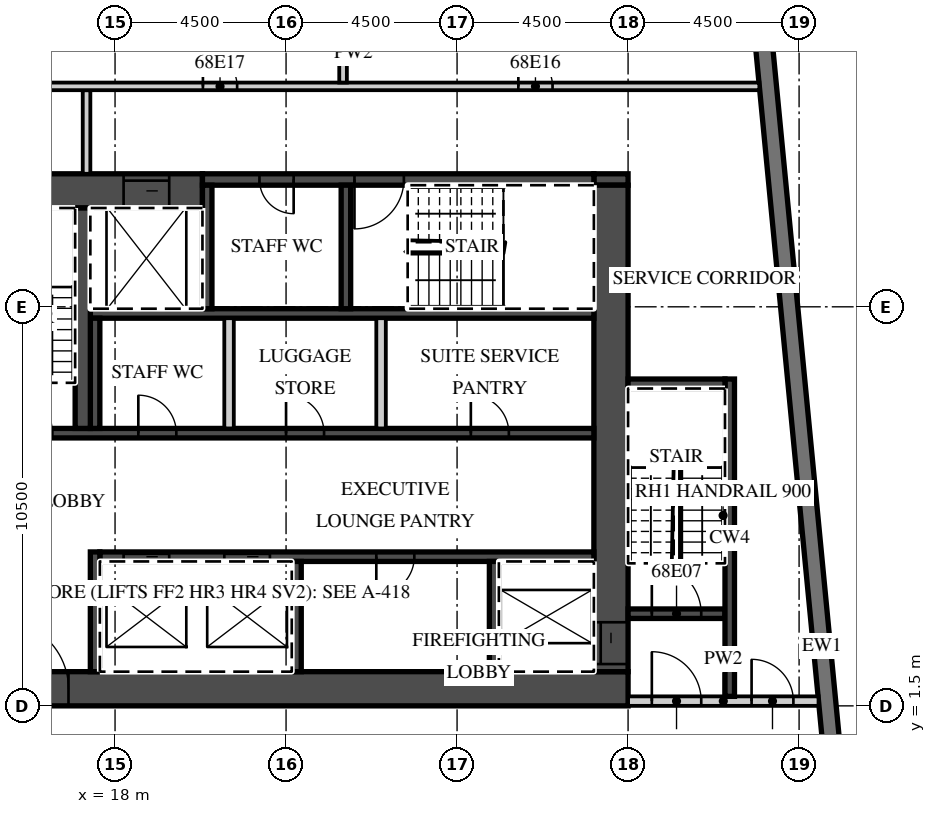
"""IFC4 building model, lengths in metres.
Left out: names, types, materials, properties, quantities, classifications, styles, units other than length and angle.
Written with IfcOpenShell. Run it as: python <this file> out.ifc"""

import sys

from ifc_helpers import new_model, si_unit, direction, frame, frame_2d, origin, place, context, subcontext, project, spatial, rectangle, extrude, element, fill, save


model = new_model("IFC4")
c1 = context("Model", 3, precision=1e-05, world=origin(), true_north=direction((0.0, 1.0)))
c2 = subcontext(c1, "Body", "Model", "MODEL_VIEW")
j1 = project(units=[si_unit("LENGTHUNIT", "METRE"), si_unit("PLANEANGLEUNIT", "RADIAN")], contexts=[c1])
p1 = place(None, origin())
s1 = spatial("IfcSite", under=j1, at=p1, CompositionType="ELEMENT")
p2 = place(p1, origin())
s2 = spatial("IfcBuilding", under=s1, at=p2, CompositionType="ELEMENT")
p3 = place(p2, frame((0.0, 0.0, 275.1)))
s3 = spatial("IfcBuildingStorey", under=s2, at=p3, CompositionType="ELEMENT", Elevation=275.1)
p4 = place(p3, frame((38.132, -12.858, 0.0), z_axis=(0.0, 0.0, 1.0), x_axis=(-0.095847749461, 0.995396006082, 0.0)))
e1 = element("IfcWall", 1, at=p4, inside=s3, PredefinedType="SOLIDWALL", context=c2, shape_type="SweptSolid", body=[
    extrude(rectangle(XDim=32.0, YDim=0.45, at=frame_2d((16.0, 0.0))), origin(), (0.0, 0.0, 1.0), 3.02),
])
p5 = place(p3, frame((13.5, 1.95, 0.0), z_axis=(0.0, 0.0, 1.0), x_axis=(1.0, 0.0, 0.0)))
e2 = element("IfcWall", 2, at=p5, inside=s3, PredefinedType="SHEAR", context=c2, shape_type="SweptSolid", body=[
    extrude(rectangle(XDim=18.0, YDim=0.9, at=frame_2d((9.0, 0.0))), origin(), (0.0, 0.0, 1.0), 3.02),
])
p6 = place(p5, frame((1.475, 0.0, 0.0)))
e3 = element("IfcOpeningElement", 3, at=p6, cuts=e2, PredefinedType="OPENING", context=c2, shape_type="SweptSolid", body=[
    extrude(rectangle(XDim=1.8, YDim=2.1, at=frame_2d((0.9, 1.05))), frame((0.0, 0.46, 0.0), z_axis=(0.0, -1.0, 0.0), x_axis=(1.0, 0.0, 0.0)), (0.0, 0.0, 1.0), 0.92),
])
p7 = place(p3, frame((13.5, 15.05, 0.0), z_axis=(0.0, 0.0, 1.0), x_axis=(1.0, 0.0, 0.0)))
e4 = element("IfcWall", 4, at=p7, inside=s3, PredefinedType="SHEAR", context=c2, shape_type="SweptSolid", body=[
    extrude(rectangle(XDim=6.8, YDim=0.9, at=frame_2d((3.4, 0.0))), origin(), (0.0, 0.0, 1.0), 3.02),
])
p8 = place(p7, frame((4.725, 0.0, 0.0)))
e5 = element("IfcOpeningElement", 5, at=p8, cuts=e4, PredefinedType="OPENING", context=c2, shape_type="SweptSolid", body=[
    extrude(rectangle(XDim=1.2, YDim=2.1, at=frame_2d((0.6, 1.05))), frame((0.0, 0.46, 0.0), z_axis=(0.0, -1.0, 0.0), x_axis=(1.0, 0.0, 0.0)), (0.0, 0.0, 1.0), 0.92),
])
p9 = place(p3, frame((30.6, 15.35, 0.0), z_axis=(0.0, 0.0, 1.0), x_axis=(1.0, 0.0, 0.0)))
e6 = element("IfcWall", 6, at=p9, inside=s3, PredefinedType="SHEAR", context=c2, shape_type="SweptSolid", body=[
    extrude(rectangle(XDim=0.9, YDim=0.3, at=frame_2d((0.45, 0.0))), origin(), (0.0, 0.0, 1.0), 3.02),
])
p10 = place(p3, frame((20.3, 15.35, 0.0), z_axis=(0.0, 0.0, 1.0), x_axis=(1.0, 0.0, 0.0)))
e7 = element("IfcWall", 7, at=p10, inside=s3, PredefinedType="SHEAR", context=c2, shape_type="SweptSolid", body=[
    extrude(rectangle(XDim=10.3, YDim=0.3, at=frame_2d((5.15, 0.0))), origin(), (0.0, 0.0, 1.0), 3.02),
])
p11 = place(p10, frame((4.0, 0.0, 0.0)))
e8 = element("IfcOpeningElement", 8, at=p11, cuts=e7, PredefinedType="OPENING", context=c2, shape_type="SweptSolid", body=[
    extrude(rectangle(XDim=1.3, YDim=2.1, at=frame_2d((0.65, 1.05))), frame((0.0, 0.16, 0.0), z_axis=(0.0, -1.0, 0.0), x_axis=(1.0, 0.0, 0.0)), (0.0, 0.0, 1.0), 0.32),
])
p12 = place(p10, frame((1.5, 0.0, 0.0)))
e9 = element("IfcOpeningElement", 9, at=p12, cuts=e7, PredefinedType="OPENING", context=c2, shape_type="SweptSolid", body=[
    extrude(rectangle(XDim=0.9, YDim=2.1, at=frame_2d((0.45, 1.05))), frame((0.0, 0.16, 0.0), z_axis=(0.0, -1.0, 0.0), x_axis=(1.0, 0.0, 0.0)), (0.0, 0.0, 1.0), 0.32),
])
p13 = place(p3, frame((31.05, 2.4, 0.0), z_axis=(0.0, 0.0, 1.0), x_axis=(0.0, 1.0, 0.0)))
e10 = element("IfcWall", 10, at=p13, inside=s3, PredefinedType="SHEAR", context=c2, shape_type="SweptSolid", body=[
    extrude(rectangle(XDim=12.8, YDim=0.9, at=frame_2d((6.4, 0.0))), origin(), (0.0, 0.0, 1.0), 3.02),
])
p14 = place(p13, frame((0.2, 0.0, 0.0)))
e11 = element("IfcOpeningElement", 11, at=p14, cuts=e10, PredefinedType="OPENING", context=c2, shape_type="SweptSolid", body=[
    extrude(rectangle(XDim=1.1, YDim=2.1, at=frame_2d((0.55, 1.05))), frame((0.0, 0.46, 0.0), z_axis=(0.0, -1.0, 0.0), x_axis=(1.0, 0.0, 0.0)), (0.0, 0.0, 1.0), 0.92),
])
p15 = place(p3, frame((17.6, 5.425, 0.0), z_axis=(0.0, 0.0, 1.0), x_axis=(1.0, 0.0, 0.0)))
e12 = element("IfcWall", 12, at=p15, inside=s3, PredefinedType="SHEAR", context=c2, shape_type="SweptSolid", body=[
    extrude(rectangle(XDim=13.0, YDim=0.25, at=frame_2d((6.5, 0.0))), origin(), (0.0, 0.0, 1.0), 3.02),
])
p16 = place(p15, frame((3.275, 0.0, 0.0)))
e13 = element("IfcOpeningElement", 13, at=p16, cuts=e12, PredefinedType="OPENING", context=c2, shape_type="SweptSolid", body=[
    extrude(rectangle(XDim=1.2, YDim=2.1, at=frame_2d((0.6, 1.05))), frame((0.0, 0.135, 0.0), z_axis=(0.0, -1.0, 0.0), x_axis=(1.0, 0.0, 0.0)), (0.0, 0.0, 1.0), 0.27),
])
p17 = place(p15, frame((0.625, 0.0, 0.0)))
e14 = element("IfcOpeningElement", 14, at=p17, cuts=e12, PredefinedType="OPENING", context=c2, shape_type="SweptSolid", body=[
    extrude(rectangle(XDim=1.2, YDim=2.1, at=frame_2d((0.6, 1.05))), frame((0.0, 0.135, 0.0), z_axis=(0.0, -1.0, 0.0), x_axis=(1.0, 0.0, 0.0)), (0.0, 0.0, 1.0), 0.27),
])
p18 = place(p15, frame((7.275, 0.0, 0.0)))
e15 = element("IfcOpeningElement", 15, at=p18, cuts=e12, PredefinedType="OPENING", context=c2, shape_type="SweptSolid", body=[
    extrude(rectangle(XDim=1.0, YDim=2.1, at=frame_2d((0.5, 1.05))), frame((0.0, 0.135, 0.0), z_axis=(0.0, -1.0, 0.0), x_axis=(1.0, 0.0, 0.0)), (0.0, 0.0, 1.0), 0.27),
])
p19 = place(p3, frame((17.475, 2.4, 0.0), z_axis=(0.0, 0.0, 1.0), x_axis=(0.0, 1.0, 0.0)))
e16 = element("IfcWall", 16, at=p19, inside=s3, PredefinedType="SHEAR", context=c2, shape_type="SweptSolid", body=[
    extrude(rectangle(XDim=3.15, YDim=0.25, at=frame_2d((1.575, 0.0))), origin(), (0.0, 0.0, 1.0), 3.02),
])
for number, where, z_axis, x_axis in (
    (17, (27.975, 2.4, 0.0), (0.0, 0.0, 1.0), (0.0, 1.0, 0.0)),
    (18, (22.775, 2.4, 0.0), (0.0, 0.0, 1.0), (0.0, 1.0, 0.0)),
):
    element("IfcWall", number, at=place(p3, frame(where, z_axis=z_axis, x_axis=x_axis)), inside=s3, PredefinedType="SHEAR", context=c2, shape_type="SweptSolid", body=[
        extrude(rectangle(XDim=2.9, YDim=0.25, at=frame_2d((1.45, 0.0))), origin(), (0.0, 0.0, 1.0), 3.02),
    ])
p20 = place(p3, frame((14.4, 8.675, 0.0), z_axis=(0.0, 0.0, 1.0), x_axis=(1.0, 0.0, 0.0)))
e19 = element("IfcWall", 19, at=p20, inside=s3, PredefinedType="SHEAR", context=c2, shape_type="SweptSolid", body=[
    extrude(rectangle(XDim=16.2, YDim=0.25, at=frame_2d((8.1, 0.0))), origin(), (0.0, 0.0, 1.0), 3.02),
])
p21 = place(p20, frame((0.65, 0.0, 0.0)))
e20 = element("IfcOpeningElement", 20, at=p21, cuts=e19, PredefinedType="OPENING", context=c2, shape_type="SweptSolid", body=[
    extrude(rectangle(XDim=1.3, YDim=2.1, at=frame_2d((0.65, 1.05))), frame((0.0, 0.135, 0.0), z_axis=(0.0, -1.0, 0.0), x_axis=(1.0, 0.0, 0.0)), (0.0, 0.0, 1.0), 0.27),
])
p22 = place(p20, frame((12.962, 0.0, 0.0)))
e21 = element("IfcOpeningElement", 21, at=p22, cuts=e19, PredefinedType="OPENING", context=c2, shape_type="SweptSolid", body=[
    extrude(rectangle(XDim=1.0, YDim=2.1, at=frame_2d((0.5, 1.05))), frame((0.0, 0.135, 0.0), z_axis=(0.0, -1.0, 0.0), x_axis=(1.0, 0.0, 0.0)), (0.0, 0.0, 1.0), 0.27),
])
p23 = place(p20, frame((8.1, 0.0, 0.0)))
e22 = element("IfcOpeningElement", 22, at=p23, cuts=e19, PredefinedType="OPENING", context=c2, shape_type="SweptSolid", body=[
    extrude(rectangle(XDim=1.0, YDim=2.1, at=frame_2d((0.5, 1.05))), frame((0.0, 0.135, 0.0), z_axis=(0.0, -1.0, 0.0), x_axis=(1.0, 0.0, 0.0)), (0.0, 0.0, 1.0), 0.27),
])
p24 = place(p20, frame((4.212, 0.0, 0.0)))
e23 = element("IfcOpeningElement", 23, at=p24, cuts=e19, PredefinedType="OPENING", context=c2, shape_type="SweptSolid", body=[
    extrude(rectangle(XDim=1.0, YDim=2.1, at=frame_2d((0.5, 1.05))), frame((0.0, 0.135, 0.0), z_axis=(0.0, -1.0, 0.0), x_axis=(1.0, 0.0, 0.0)), (0.0, 0.0, 1.0), 0.27),
])
p25 = place(p3, frame((17.35, 11.825, 0.0), z_axis=(0.0, 0.0, 1.0), x_axis=(1.0, 0.0, 0.0)))
e24 = element("IfcWall", 24, at=p25, inside=s3, PredefinedType="SHEAR", context=c2, shape_type="SweptSolid", body=[
    extrude(rectangle(XDim=13.25, YDim=0.25, at=frame_2d((6.625, 0.0))), origin(), (0.0, 0.0, 1.0), 3.02),
])
p26 = place(p3, frame((17.475, 8.8, 0.0), z_axis=(0.0, 0.0, 1.0), x_axis=(0.0, 1.0, 0.0)))
e25 = element("IfcWall", 25, at=p26, inside=s3, PredefinedType="SHEAR", context=c2, shape_type="SweptSolid", body=[
    extrude(rectangle(XDim=2.9, YDim=0.25, at=frame_2d((1.45, 0.0))), origin(), (0.0, 0.0, 1.0), 3.02),
])
for number, where, z_axis, x_axis in (
    (26, (25.0, 8.8, 0.0), (0.0, 0.0, 1.0), (0.0, 1.0, 0.0)),
    (27, (21.0, 8.8, 0.0), (0.0, 0.0, 1.0), (0.0, 1.0, 0.0)),
):
    element("IfcWall", number, at=place(p3, frame(where, z_axis=z_axis, x_axis=x_axis)), inside=s3, PredefinedType="PARTITIONING", context=c2, shape_type="SweptSolid", body=[
        extrude(rectangle(XDim=2.9, YDim=0.25, at=frame_2d((1.45, 0.0))), origin(), (0.0, 0.0, 1.0), 3.02),
    ])
p27 = place(p3, frame((17.15, 8.8, 0.0), z_axis=(0.0, 0.0, 1.0), x_axis=(0.0, 1.0, 0.0)))
e28 = element("IfcWall", 28, at=p27, inside=s3, PredefinedType="SHEAR", context=c2, shape_type="SweptSolid", body=[
    extrude(rectangle(XDim=5.8, YDim=0.4, at=frame_2d((2.9, 0.0))), origin(), (0.0, 0.0, 1.0), 3.02),
])
for number, where, z_axis, x_axis in (
    (29, (20.425, 11.95, 0.0), (0.0, 0.0, 1.0), (0.0, 1.0, 0.0)),
    (30, (24.075, 11.95, 0.0), (0.0, 0.0, 1.0), (0.0, 1.0, 0.0)),
):
    element("IfcWall", number, at=place(p3, frame(where, z_axis=z_axis, x_axis=x_axis)), inside=s3, PredefinedType="SHEAR", context=c2, shape_type="SweptSolid", body=[
        extrude(rectangle(XDim=3.25, YDim=0.25, at=frame_2d((1.625, 0.0))), origin(), (0.0, 0.0, 1.0), 3.02),
    ])
p28 = place(p3, frame((31.5, 1.625, 0.0), z_axis=(0.0, 0.0, 1.0), x_axis=(1.0, 0.0, 0.0)))
e31 = element("IfcWall", 31, at=p28, inside=s3, PredefinedType="PARTITIONING", context=c2, shape_type="SweptSolid", body=[
    extrude(rectangle(XDim=5.012, YDim=0.25, at=frame_2d((2.506, 0.0))), origin(), (0.0, 0.0, 1.0), 3.02),
])
p29 = place(p28, frame((0.625, 0.0, 0.0)))
e32 = element("IfcOpeningElement", 32, at=p29, cuts=e31, PredefinedType="OPENING", context=c2, shape_type="SweptSolid", body=[
    extrude(rectangle(XDim=1.3, YDim=2.1, at=frame_2d((0.65, 1.05))), frame((0.0, 0.135, 0.0), z_axis=(0.0, -1.0, 0.0), x_axis=(1.0, 0.0, 0.0)), (0.0, 0.0, 1.0), 0.27),
])
p30 = place(p28, frame((3.25, 0.0, 0.0)))
e33 = element("IfcOpeningElement", 33, at=p30, cuts=e31, PredefinedType="OPENING", context=c2, shape_type="SweptSolid", body=[
    extrude(rectangle(XDim=1.1, YDim=2.1, at=frame_2d((0.55, 1.05))), frame((0.0, 0.135, 0.0), z_axis=(0.0, -1.0, 0.0), x_axis=(1.0, 0.0, 0.0)), (0.0, 0.0, 1.0), 0.27),
])
p31 = place(p3, frame((31.5, 3.925, 0.0), z_axis=(0.0, 0.0, 1.0), x_axis=(1.0, 0.0, 0.0)))
e34 = element("IfcWall", 34, at=p31, inside=s3, PredefinedType="SHEAR", context=c2, shape_type="SweptSolid", body=[
    extrude(rectangle(XDim=2.55, YDim=0.25, at=frame_2d((1.275, 0.0))), origin(), (0.0, 0.0, 1.0), 3.02),
])
p32 = place(p31, frame((0.625, 0.0, 0.0)))
e35 = element("IfcOpeningElement", 35, at=p32, cuts=e34, PredefinedType="OPENING", context=c2, shape_type="SweptSolid", body=[
    extrude(rectangle(XDim=1.3, YDim=2.1, at=frame_2d((0.65, 1.05))), frame((0.0, 0.135, 0.0), z_axis=(0.0, -1.0, 0.0), x_axis=(1.0, 0.0, 0.0)), (0.0, 0.0, 1.0), 0.27),
])
p33 = place(p3, frame((34.175, 1.75, 0.0), z_axis=(0.0, 0.0, 1.0), x_axis=(0.0, 1.0, 0.0)))
e36 = element("IfcWall", 36, at=p33, inside=s3, PredefinedType="SHEAR", context=c2, shape_type="SweptSolid", body=[
    extrude(rectangle(XDim=8.35, YDim=0.25, at=frame_2d((4.175, 0.0))), origin(), (0.0, 0.0, 1.0), 3.02),
])
p34 = place(p3, frame((31.5, 9.975, 0.0), z_axis=(0.0, 0.0, 1.0), x_axis=(1.0, 0.0, 0.0)))
e37 = element("IfcWall", 37, at=p34, inside=s3, PredefinedType="SHEAR", context=c2, shape_type="SweptSolid", body=[
    extrude(rectangle(XDim=2.55, YDim=0.25, at=frame_2d((1.275, 0.0))), origin(), (0.0, 0.0, 1.0), 3.02),
])
p35 = place(p3, frame((17.25, 15.5, 0.0), z_axis=(0.0, 0.0, 1.0), x_axis=(0.0, 1.0, 0.0)))
e38 = element("IfcWall", 38, at=p35, inside=s3, PredefinedType="PARTITIONING", context=c2, shape_type="SweptSolid", body=[
    extrude(rectangle(XDim=2.2, YDim=0.2, at=frame_2d((1.1, 0.0))), origin(), (0.0, 0.0, 1.0), 3.02),
])
p36 = place(p3, frame((13.6, 17.8, 0.0), z_axis=(0.0, 0.0, 1.0), x_axis=(1.0, 0.0, 0.0)))
e39 = element("IfcWall", 39, at=p36, inside=s3, PredefinedType="PARTITIONING", context=c2, shape_type="SweptSolid", body=[
    extrude(rectangle(XDim=21.354, YDim=0.2, at=frame_2d((10.677, 0.0))), origin(), (0.0, 0.0, 1.0), 3.02),
])
p37 = place(p36, frame((15.012, 0.0, 0.0)))
e40 = element("IfcOpeningElement", 40, at=p37, cuts=e39, PredefinedType="OPENING", context=c2, shape_type="SweptSolid", body=[
    extrude(rectangle(XDim=0.9, YDim=2.1, at=frame_2d((0.45, 1.05))), frame((0.0, 0.11, 0.0), z_axis=(0.0, -1.0, 0.0), x_axis=(1.0, 0.0, 0.0)), (0.0, 0.0, 1.0), 0.22),
])
p38 = place(p36, frame((6.712, 0.0, 0.0)))
e41 = element("IfcOpeningElement", 41, at=p38, cuts=e39, PredefinedType="OPENING", context=c2, shape_type="SweptSolid", body=[
    extrude(rectangle(XDim=0.9, YDim=2.1, at=frame_2d((0.45, 1.05))), frame((0.0, 0.11, 0.0), z_axis=(0.0, -1.0, 0.0), x_axis=(1.0, 0.0, 0.0)), (0.0, 0.0, 1.0), 0.22),
])
p39 = place(p3, frame((24.0, 17.9, 0.0), z_axis=(0.0, 0.0, 1.0), x_axis=(0.0, 1.0, 0.0)))
e42 = element("IfcWall", 42, at=p39, inside=s3, PredefinedType="PARTITIONING", context=c2, shape_type="SweptSolid", body=[
    extrude(rectangle(XDim=3.597, YDim=0.2, at=frame_2d((1.798, 0.0))), origin(), (0.0, 0.0, 1.0), 3.02),
])
p40 = place(p16, origin())
e43 = element("IfcDoor", 43, at=p40, inside=s3, OperationType="SLIDING_TO_RIGHT", PredefinedType="DOOR", context=c2, shape_type="SweptSolid", body=[
    extrude(rectangle(XDim=1.2, YDim=2.1, at=frame_2d((0.6, 1.05))), frame((0.0, 0.025, 0.0), z_axis=(0.0, -1.0, 0.0), x_axis=(1.0, 0.0, 0.0)), (0.0, 0.0, 1.0), 0.05),
])
fill(e13, e43)
p41 = place(p17, origin())
e44 = element("IfcDoor", 44, at=p41, inside=s3, OperationType="SLIDING_TO_LEFT", PredefinedType="DOOR", context=c2, shape_type="SweptSolid", body=[
    extrude(rectangle(XDim=1.2, YDim=2.1, at=frame_2d((0.6, 1.05))), frame((0.0, 0.025, 0.0), z_axis=(0.0, -1.0, 0.0), x_axis=(1.0, 0.0, 0.0)), (0.0, 0.0, 1.0), 0.05),
])
fill(e14, e44)
p42 = place(p8, origin())
e45 = element("IfcDoor", 45, at=p42, inside=s3, OperationType="SLIDING_TO_LEFT", PredefinedType="DOOR", context=c2, shape_type="SweptSolid", body=[
    extrude(rectangle(XDim=1.2, YDim=2.1, at=frame_2d((0.6, 1.05))), frame((0.0, 0.025, 0.0), z_axis=(0.0, -1.0, 0.0), x_axis=(1.0, 0.0, 0.0)), (0.0, 0.0, 1.0), 0.05),
])
fill(e5, e45)
p43 = place(p14, origin())
e46 = element("IfcDoor", 46, at=p43, inside=s3, OperationType="SLIDING_TO_LEFT", PredefinedType="DOOR", context=c2, shape_type="SweptSolid", body=[
    extrude(rectangle(XDim=1.1, YDim=2.1, at=frame_2d((0.55, 1.05))), frame((0.0, 0.025, 0.0), z_axis=(0.0, -1.0, 0.0), x_axis=(1.0, 0.0, 0.0)), (0.0, 0.0, 1.0), 0.05),
])
fill(e11, e46)
p44 = place(p6, origin())
e47 = element("IfcDoor", 47, at=p44, inside=s3, OperationType="DOUBLE_DOOR_DOUBLE_SWING", PredefinedType="DOOR", context=c2, shape_type="SweptSolid", body=[
    extrude(rectangle(XDim=1.8, YDim=2.1, at=frame_2d((0.9, 1.05))), frame((0.0, 0.025, 0.0), z_axis=(0.0, -1.0, 0.0), x_axis=(1.0, 0.0, 0.0)), (0.0, 0.0, 1.0), 0.05),
])
fill(e3, e47)
p45 = place(p29, origin())
e48 = element("IfcDoor", 48, at=p45, inside=s3, OperationType="SINGLE_SWING_LEFT", PredefinedType="DOOR", context=c2, shape_type="SweptSolid", body=[
    extrude(rectangle(XDim=1.3, YDim=2.1, at=frame_2d((0.65, 1.05))), frame((0.0, 0.025, 0.0), z_axis=(0.0, -1.0, 0.0), x_axis=(1.0, 0.0, 0.0)), (0.0, 0.0, 1.0), 0.05),
])
fill(e32, e48)
p46 = place(p32, origin())
e49 = element("IfcDoor", 49, at=p46, inside=s3, OperationType="SINGLE_SWING_LEFT", PredefinedType="DOOR", context=c2, shape_type="SweptSolid", body=[
    extrude(rectangle(XDim=1.3, YDim=2.1, at=frame_2d((0.65, 1.05))), frame((0.0, 0.025, 0.0), z_axis=(0.0, -1.0, 0.0), x_axis=(1.0, 0.0, 0.0)), (0.0, 0.0, 1.0), 0.05),
])
fill(e35, e49)
p47 = place(p30, origin())
e50 = element("IfcDoor", 50, at=p47, inside=s3, OperationType="SINGLE_SWING_LEFT", PredefinedType="DOOR", context=c2, shape_type="SweptSolid", body=[
    extrude(rectangle(XDim=1.1, YDim=2.1, at=frame_2d((0.55, 1.05))), frame((0.0, 0.025, 0.0), z_axis=(0.0, -1.0, 0.0), x_axis=(1.0, 0.0, 0.0)), (0.0, 0.0, 1.0), 0.05),
])
fill(e33, e50)
p48 = place(p11, origin())
e51 = element("IfcDoor", 51, at=p48, inside=s3, OperationType="SINGLE_SWING_LEFT", PredefinedType="DOOR", context=c2, shape_type="SweptSolid", body=[
    extrude(rectangle(XDim=1.3, YDim=2.1, at=frame_2d((0.65, 1.05))), frame((0.0, 0.025, 0.0), z_axis=(0.0, -1.0, 0.0), x_axis=(1.0, 0.0, 0.0)), (0.0, 0.0, 1.0), 0.05),
])
fill(e8, e51)
p49 = place(p12, origin())
e52 = element("IfcDoor", 52, at=p49, inside=s3, OperationType="SINGLE_SWING_RIGHT", PredefinedType="DOOR", context=c2, shape_type="SweptSolid", body=[
    extrude(rectangle(XDim=0.9, YDim=2.1, at=frame_2d((0.45, 1.05))), frame((0.0, 0.025, 0.0), z_axis=(0.0, -1.0, 0.0), x_axis=(1.0, 0.0, 0.0)), (0.0, 0.0, 1.0), 0.05),
])
fill(e9, e52)
p50 = place(p22, origin())
e53 = element("IfcDoor", 53, at=p50, inside=s3, OperationType="SINGLE_SWING_LEFT", PredefinedType="DOOR", context=c2, shape_type="SweptSolid", body=[
    extrude(rectangle(XDim=1.0, YDim=2.1, at=frame_2d((0.5, 1.05))), frame((0.0, 0.025, 0.0), z_axis=(0.0, -1.0, 0.0), x_axis=(1.0, 0.0, 0.0)), (0.0, 0.0, 1.0), 0.05),
])
fill(e21, e53)
p51 = place(p23, origin())
e54 = element("IfcDoor", 54, at=p51, inside=s3, OperationType="SINGLE_SWING_LEFT", PredefinedType="DOOR", context=c2, shape_type="SweptSolid", body=[
    extrude(rectangle(XDim=1.0, YDim=2.1, at=frame_2d((0.5, 1.05))), frame((0.0, 0.025, 0.0), z_axis=(0.0, -1.0, 0.0), x_axis=(1.0, 0.0, 0.0)), (0.0, 0.0, 1.0), 0.05),
])
fill(e22, e54)
p52 = place(p24, origin())
e55 = element("IfcDoor", 55, at=p52, inside=s3, OperationType="SINGLE_SWING_LEFT", PredefinedType="DOOR", context=c2, shape_type="SweptSolid", body=[
    extrude(rectangle(XDim=1.0, YDim=2.1, at=frame_2d((0.5, 1.05))), frame((0.0, 0.025, 0.0), z_axis=(0.0, -1.0, 0.0), x_axis=(1.0, 0.0, 0.0)), (0.0, 0.0, 1.0), 0.05),
])
fill(e23, e55)
p53 = place(p18, origin())
e56 = element("IfcDoor", 56, at=p53, inside=s3, OperationType="SINGLE_SWING_LEFT", PredefinedType="DOOR", context=c2, shape_type="SweptSolid", body=[
    extrude(rectangle(XDim=1.0, YDim=2.1, at=frame_2d((0.5, 1.05))), frame((0.0, 0.025, 0.0), z_axis=(0.0, -1.0, 0.0), x_axis=(1.0, 0.0, 0.0)), (0.0, 0.0, 1.0), 0.05),
])
fill(e15, e56)
p54 = place(p37, origin())
e57 = element("IfcDoor", 57, at=p54, inside=s3, OperationType="SINGLE_SWING_LEFT", PredefinedType="DOOR", context=c2, shape_type="SweptSolid", body=[
    extrude(rectangle(XDim=0.9, YDim=2.1, at=frame_2d((0.45, 1.05))), frame((0.0, 0.025, 0.0), z_axis=(0.0, -1.0, 0.0), x_axis=(1.0, 0.0, 0.0)), (0.0, 0.0, 1.0), 0.05),
])
fill(e40, e57)
p55 = place(p38, origin())
e58 = element("IfcDoor", 58, at=p55, inside=s3, OperationType="SINGLE_SWING_LEFT", PredefinedType="DOOR", context=c2, shape_type="SweptSolid", body=[
    extrude(rectangle(XDim=0.9, YDim=2.1, at=frame_2d((0.45, 1.05))), frame((0.0, 0.025, 0.0), z_axis=(0.0, -1.0, 0.0), x_axis=(1.0, 0.0, 0.0)), (0.0, 0.0, 1.0), 0.05),
])
fill(e41, e58)
save(model, sys.argv[1])
